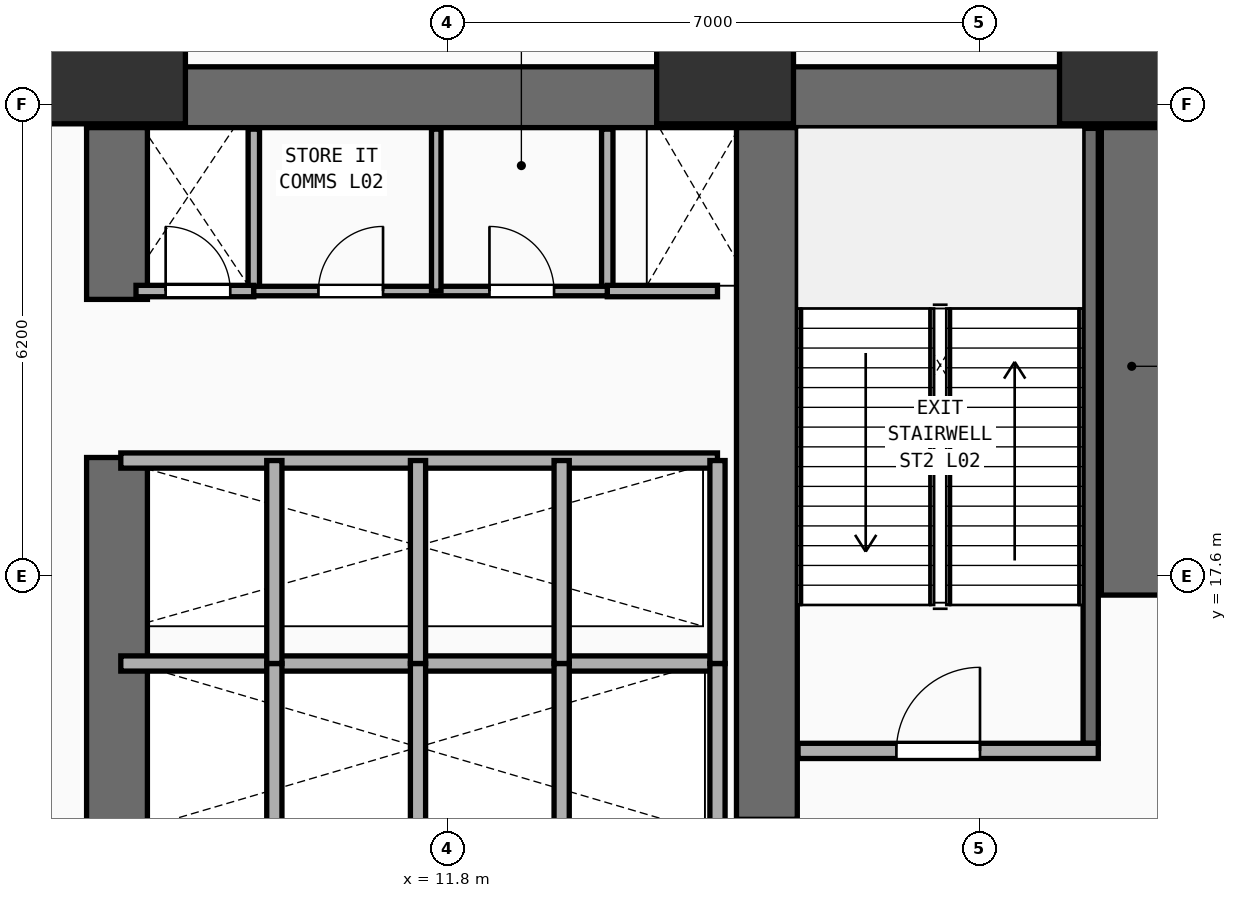
"""IFC4 building model, lengths in metres.
Left out: names, types, materials, properties, quantities, classifications, styles, units other than length and angle.
Written with IfcOpenShell. Run it as: python <this file> out.ifc"""

import sys

from ifc_helpers import new_model, si_unit, direction, frame, frame_2d, origin, origin_2d, place, context, subcontext, project, spatial, rectangle, extrude, element, fill, save


model = new_model("IFC4")
c1 = context("Model", 3, precision=1e-05, world=origin(), true_north=direction((0.0, 1.0)))
c2 = subcontext(c1, "Body", "Model", "MODEL_VIEW")
j1 = project(units=[si_unit("LENGTHUNIT", "METRE"), si_unit("PLANEANGLEUNIT", "RADIAN")], contexts=[c1])
p1 = place(None, origin())
s1 = spatial("IfcSite", under=j1, at=p1, CompositionType="ELEMENT")
p2 = place(p1, origin())
s2 = spatial("IfcBuilding", under=s1, at=p2, CompositionType="ELEMENT")
p3 = place(p2, frame((0.0, 0.0, 5.6)))
s3 = spatial("IfcBuildingStorey", under=s2, at=p3, CompositionType="ELEMENT", Elevation=5.6)
p4 = place(p3, frame((7.05, 23.9, 0.0), z_axis=(0.0, 0.0, 1.0), x_axis=(1.0, 0.0, 0.0)))
e1 = element("IfcWall", 1, at=p4, inside=s3, PredefinedType="SHEAR", context=c2, shape_type="SweptSolid", body=[
    extrude(rectangle(XDim=14.15, YDim=0.8, at=frame_2d((7.075, 0.0))), origin(), (0.0, 0.0, 1.0), 4.46),
])
p5 = place(p3, frame((7.45, 14.35, 0.0), z_axis=(0.0, 0.0, 1.0), x_axis=(0.0, 1.0, 0.0)))
e2 = element("IfcWall", 2, at=p5, inside=s3, PredefinedType="SHEAR", context=c2, shape_type="SweptSolid", body=[
    extrude(rectangle(XDim=4.81, YDim=0.8, at=frame_2d((2.405, 0.0))), origin(), (0.0, 0.0, 1.0), 4.46),
])
p6 = place(p3, frame((7.45, 21.24, 0.0), z_axis=(0.0, 0.0, 1.0), x_axis=(0.0, 1.0, 0.0)))
e3 = element("IfcWall", 3, at=p6, inside=s3, PredefinedType="SHEAR", context=c2, shape_type="SweptSolid", body=[
    extrude(rectangle(XDim=2.26, YDim=0.8, at=frame_2d((1.13, 0.0))), origin(), (0.0, 0.0, 1.0), 4.46),
])
p7 = place(p3, frame((20.8, 17.35, 0.0), z_axis=(0.0, 0.0, 1.0), x_axis=(0.0, 1.0, 0.0)))
e4 = element("IfcWall", 4, at=p7, inside=s3, PredefinedType="SHEAR", context=c2, shape_type="SweptSolid", body=[
    extrude(rectangle(XDim=6.15, YDim=0.8, at=frame_2d((3.075, 0.0))), origin(), (0.0, 0.0, 1.0), 4.46),
])
p8 = place(p3, frame((16.0, 14.4, 0.0), z_axis=(0.0, 0.0, 1.0), x_axis=(0.0, 1.0, 0.0)))
e5 = element("IfcWall", 5, at=p8, inside=s3, PredefinedType="SHEAR", context=c2, shape_type="SweptSolid", body=[
    extrude(rectangle(XDim=9.1, YDim=0.8, at=frame_2d((4.55, 0.0))), origin(), (0.0, 0.0, 1.0), 4.46),
])
for number, where, z_axis, x_axis in (
    (6, (7.45, 24.45, 0.0), (0.0, 0.0, 1.0), (1.0, 0.0, 0.0)),
    (7, (15.45, 24.45, 0.0), (0.0, 0.0, 1.0), (1.0, 0.0, 0.0)),
    (8, (20.75, 24.45, 0.0), (0.0, 0.0, 1.0), (1.0, 0.0, 0.0)),
):
    element("IfcColumn", number, at=place(p3, frame(where, z_axis=z_axis, x_axis=x_axis)), inside=s3, PredefinedType="COLUMN", context=c2, shape_type="SweptSolid", body=[
        extrude(rectangle(XDim=1.8, YDim=1.8, at=origin_2d()), origin(), (0.0, 0.0, 1.0), 4.46),
    ])
p9 = place(p3, frame((20.26, 15.4, 0.0), z_axis=(0.0, 0.0, 1.0), x_axis=(0.0, 1.0, 0.0)))
e9 = element("IfcWall", 9, at=p9, inside=s3, PredefinedType="SHEAR", context=c2, shape_type="SweptSolid", body=[
    extrude(rectangle(XDim=8.09, YDim=0.2, at=frame_2d((4.045, 0.0))), origin(), (0.0, 0.0, 1.0), 4.46),
])
p10 = place(p3, frame((16.41, 15.3, 0.0), z_axis=(0.0, 0.0, 1.0), x_axis=(1.0, 0.0, 0.0)))
e10 = element("IfcWall", 10, at=p10, inside=s3, PredefinedType="PARTITIONING", context=c2, shape_type="SweptSolid", body=[
    extrude(rectangle(XDim=3.95, YDim=0.2, at=frame_2d((1.975, 0.0))), origin(), (0.0, 0.0, 1.0), 4.46),
])
p11 = place(p10, frame((1.294, 0.0, 0.0)))
e11 = element("IfcOpeningElement", 11, at=p11, cuts=e10, PredefinedType="OPENING", context=c2, shape_type="SweptSolid", body=[
    extrude(rectangle(XDim=1.1, YDim=2.2, at=frame_2d((0.55, 1.1))), frame((0.0, 0.11, 0.0), z_axis=(0.0, -1.0, 0.0), x_axis=(1.0, 0.0, 0.0)), (0.0, 0.0, 1.0), 0.22),
])
p12 = place(p3, frame((7.5, 16.45, 0.0), z_axis=(0.0, 0.0, 1.0), x_axis=(1.0, 0.0, 0.0)))
e12 = element("IfcWall", 12, at=p12, inside=s3, PredefinedType="PARTITIONING", context=c2, shape_type="SweptSolid", body=[
    extrude(rectangle(XDim=7.85, YDim=0.2, at=frame_2d((3.925, 0.0))), origin(), (0.0, 0.0, 1.0), 4.46),
])
for number, where, z_axis, x_axis in (
    (13, (15.35, 14.22, 0.0), (0.0, 0.0, 1.0), (0.0, 1.0, 0.0)),
    (14, (9.52, 14.22, 0.0), (0.0, 0.0, 1.0), (0.0, 1.0, 0.0)),
    (15, (11.41, 14.22, 0.0), (0.0, 0.0, 1.0), (0.0, 1.0, 0.0)),
    (16, (13.3, 14.22, 0.0), (0.0, 0.0, 1.0), (0.0, 1.0, 0.0)),
):
    element("IfcWall", number, at=place(p3, frame(where, z_axis=z_axis, x_axis=x_axis)), inside=s3, PredefinedType="PARTITIONING", context=c2, shape_type="SweptSolid", body=[
        extrude(rectangle(XDim=2.23, YDim=0.2, at=frame_2d((1.115, 0.0))), origin(), (0.0, 0.0, 1.0), 4.46),
    ])
p13 = place(p3, frame((7.5, 19.12, 0.0), z_axis=(0.0, 0.0, 1.0), x_axis=(1.0, 0.0, 0.0)))
e17 = element("IfcWall", 17, at=p13, inside=s3, PredefinedType="PARTITIONING", context=c2, shape_type="SweptSolid", body=[
    extrude(rectangle(XDim=7.85, YDim=0.2, at=frame_2d((3.925, 0.0))), origin(), (0.0, 0.0, 1.0), 4.46),
])
for number, where, z_axis, x_axis in (
    (18, (15.35, 16.45, 0.0), (0.0, 0.0, 1.0), (0.0, 1.0, 0.0)),
    (19, (9.52, 16.45, 0.0), (0.0, 0.0, 1.0), (0.0, 1.0, 0.0)),
    (20, (11.41, 16.45, 0.0), (0.0, 0.0, 1.0), (0.0, 1.0, 0.0)),
    (21, (13.3, 16.45, 0.0), (0.0, 0.0, 1.0), (0.0, 1.0, 0.0)),
):
    element("IfcWall", number, at=place(p3, frame(where, z_axis=z_axis, x_axis=x_axis)), inside=s3, PredefinedType="PARTITIONING", context=c2, shape_type="SweptSolid", body=[
        extrude(rectangle(XDim=2.67, YDim=0.2, at=frame_2d((1.335, 0.0))), origin(), (0.0, 0.0, 1.0), 4.46),
    ])
for number, where, z_axis, x_axis in (
    (22, (9.25, 21.35, 0.0), (0.0, 0.0, 1.0), (0.0, 1.0, 0.0)),
    (23, (13.9, 21.35, 0.0), (0.0, 0.0, 1.0), (0.0, 1.0, 0.0)),
):
    element("IfcWall", number, at=place(p3, frame(where, z_axis=z_axis, x_axis=x_axis)), inside=s3, PredefinedType="PARTITIONING", context=c2, shape_type="SweptSolid", body=[
        extrude(rectangle(XDim=2.13, YDim=0.15, at=frame_2d((1.065, 0.0))), origin(), (0.0, 0.0, 1.0), 4.46),
    ])
p14 = place(p3, frame((7.7, 21.35, 0.0), z_axis=(0.0, 0.0, 1.0), x_axis=(1.0, 0.0, 0.0)))
e24 = element("IfcWall", 24, at=p14, inside=s3, PredefinedType="PARTITIONING", context=c2, shape_type="SweptSolid", body=[
    extrude(rectangle(XDim=1.55, YDim=0.15, at=frame_2d((0.775, 0.0))), origin(), (0.0, 0.0, 1.0), 4.46),
])
p15 = place(p14, frame((0.39, 0.0, 0.0)))
e25 = element("IfcOpeningElement", 25, at=p15, cuts=e24, PredefinedType="OPENING", context=c2, shape_type="SweptSolid", body=[
    extrude(rectangle(XDim=0.85, YDim=2.15, at=frame_2d((0.425, 1.075))), frame((0.0, 0.085, 0.0), z_axis=(0.0, -1.0, 0.0), x_axis=(1.0, 0.0, 0.0)), (0.0, 0.0, 1.0), 0.17),
])
p16 = place(p3, frame((13.9, 21.35, 0.0), z_axis=(0.0, 0.0, 1.0), x_axis=(1.0, 0.0, 0.0)))
e26 = element("IfcWall", 26, at=p16, inside=s3, PredefinedType="PARTITIONING", context=c2, shape_type="SweptSolid", body=[
    extrude(rectangle(XDim=1.45, YDim=0.15, at=frame_2d((0.725, 0.0))), origin(), (0.0, 0.0, 1.0), 4.46),
])
p17 = place(p3, frame((9.25, 21.35, 0.0), z_axis=(0.0, 0.0, 1.0), x_axis=(1.0, 0.0, 0.0)))
e27 = element("IfcWall", 27, at=p17, inside=s3, PredefinedType="PARTITIONING", context=c2, shape_type="SweptSolid", body=[
    extrude(rectangle(XDim=4.65, YDim=0.125, at=frame_2d((2.325, 0.0))), origin(), (0.0, 0.0, 1.0), 4.46),
])
p18 = place(p17, frame((0.85, 0.0, 0.0)))
e28 = element("IfcOpeningElement", 28, at=p18, cuts=e27, PredefinedType="OPENING", context=c2, shape_type="SweptSolid", body=[
    extrude(rectangle(XDim=0.85, YDim=2.15, at=frame_2d((0.425, 1.075))), frame((0.0, 0.073, 0.0), z_axis=(0.0, -1.0, 0.0), x_axis=(1.0, 0.0, 0.0)), (0.0, 0.0, 1.0), 0.145),
])
p19 = place(p17, frame((3.1, 0.0, 0.0)))
e29 = element("IfcOpeningElement", 29, at=p19, cuts=e27, PredefinedType="OPENING", context=c2, shape_type="SweptSolid", body=[
    extrude(rectangle(XDim=0.85, YDim=2.15, at=frame_2d((0.425, 1.075))), frame((0.0, 0.073, 0.0), z_axis=(0.0, -1.0, 0.0), x_axis=(1.0, 0.0, 0.0)), (0.0, 0.0, 1.0), 0.145),
])
p20 = place(p3, frame((11.65, 21.35, 0.0), z_axis=(0.0, 0.0, 1.0), x_axis=(0.0, 1.0, 0.0)))
e30 = element("IfcWall", 30, at=p20, inside=s3, PredefinedType="PARTITIONING", context=c2, shape_type="SweptSolid", body=[
    extrude(rectangle(XDim=2.13, YDim=0.125, at=frame_2d((1.065, 0.0))), origin(), (0.0, 0.0, 1.0), 4.46),
])
p21 = place(p11, origin())
e31 = element("IfcDoor", 31, at=p21, inside=s3, OperationType="SINGLE_SWING_RIGHT", PredefinedType="DOOR", context=c2, shape_type="SweptSolid", body=[
    extrude(rectangle(XDim=1.1, YDim=2.2, at=frame_2d((0.55, 1.1))), frame((0.0, 0.025, 0.0), z_axis=(0.0, -1.0, 0.0), x_axis=(1.0, 0.0, 0.0)), (0.0, 0.0, 1.0), 0.05),
])
fill(e11, e31)
p22 = place(p15, origin())
e32 = element("IfcDoor", 32, at=p22, inside=s3, OperationType="SINGLE_SWING_LEFT", PredefinedType="DOOR", context=c2, shape_type="SweptSolid", body=[
    extrude(rectangle(XDim=0.85, YDim=2.15, at=frame_2d((0.425, 1.075))), frame((0.0, 0.025, 0.0), z_axis=(0.0, -1.0, 0.0), x_axis=(1.0, 0.0, 0.0)), (0.0, 0.0, 1.0), 0.05),
])
fill(e25, e32)
p23 = place(p18, origin())
e33 = element("IfcDoor", 33, at=p23, inside=s3, OperationType="SINGLE_SWING_RIGHT", PredefinedType="DOOR", context=c2, shape_type="SweptSolid", body=[
    extrude(rectangle(XDim=0.85, YDim=2.15, at=frame_2d((0.425, 1.075))), frame((0.0, 0.025, 0.0), z_axis=(0.0, -1.0, 0.0), x_axis=(1.0, 0.0, 0.0)), (0.0, 0.0, 1.0), 0.05),
])
fill(e28, e33)
p24 = place(p19, origin())
e34 = element("IfcDoor", 34, at=p24, inside=s3, OperationType="SINGLE_SWING_LEFT", PredefinedType="DOOR", context=c2, shape_type="SweptSolid", body=[
    extrude(rectangle(XDim=0.85, YDim=2.15, at=frame_2d((0.425, 1.075))), frame((0.0, 0.025, 0.0), z_axis=(0.0, -1.0, 0.0), x_axis=(1.0, 0.0, 0.0)), (0.0, 0.0, 1.0), 0.05),
])
fill(e29, e34)
save(model, sys.argv[1])
